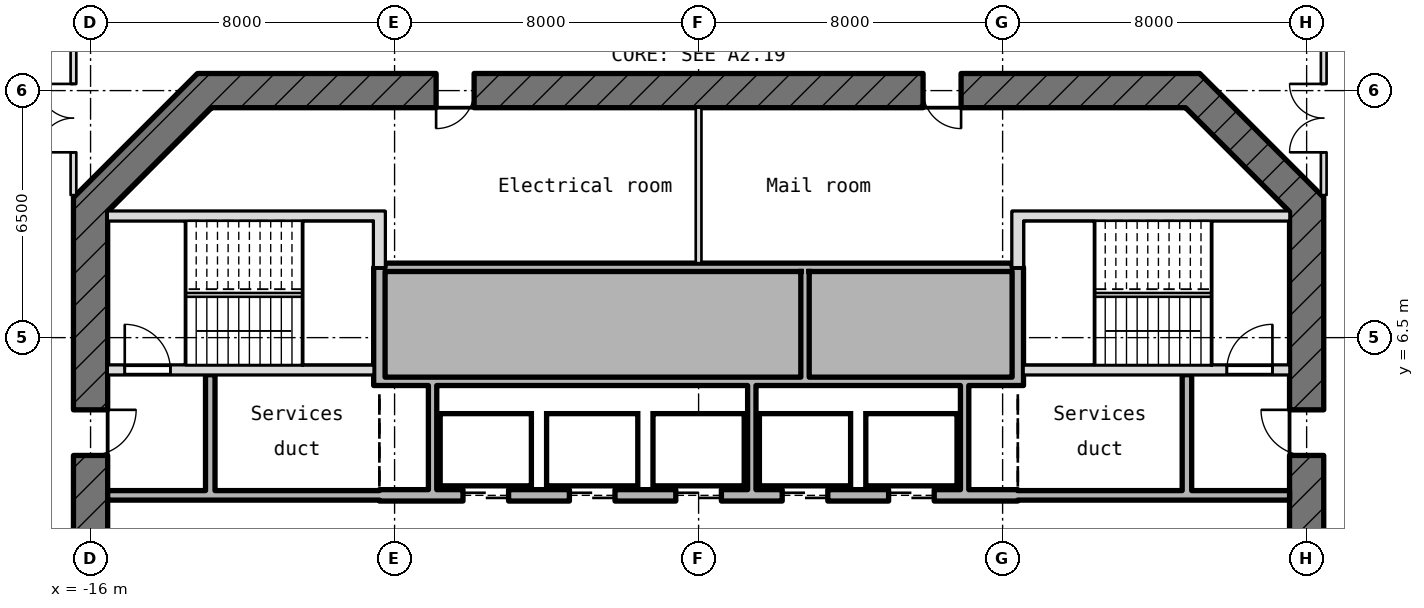
"""IFC4 building model, lengths in metres.
Left out: names, types, materials, properties, quantities, classifications, styles, units other than length and angle.
Written with IfcOpenShell. Run it as: python <this file> out.ifc"""

import sys

from ifc_helpers import new_model, si_unit, direction, frame, frame_2d, origin, place, context, subcontext, project, spatial, rectangle, extrude, element, fill, save


model = new_model("IFC4")
c1 = context("Model", 3, precision=1e-05, world=origin(), true_north=direction((0.0, 1.0)))
c2 = subcontext(c1, "Body", "Model", "MODEL_VIEW")
j1 = project(units=[si_unit("LENGTHUNIT", "METRE"), si_unit("PLANEANGLEUNIT", "RADIAN")], contexts=[c1])
p1 = place(None, origin())
s1 = spatial("IfcSite", under=j1, at=p1, CompositionType="ELEMENT")
p2 = place(p1, origin())
s2 = spatial("IfcBuilding", under=s1, at=p2, CompositionType="ELEMENT")
p3 = place(p2, frame((0.0, 0.0, 198.4)))
s3 = spatial("IfcBuildingStorey", under=s2, at=p3, CompositionType="ELEMENT", Elevation=198.4)
p4 = place(p3, frame((16.0, -10.186, -0.18), z_axis=(0.0, 0.0, 1.0), x_axis=(0.0, 1.0, 0.0)))
e1 = element("IfcWall", 1, at=p4, inside=s3, PredefinedType="SHEAR", context=c2, shape_type="SweptSolid", body=[
    extrude(rectangle(XDim=20.373, YDim=0.9, at=frame_2d((10.186, 0.0))), origin(), (0.0, 0.0, 1.0), 4.15),
])
p5 = place(p4, frame((8.986, 0.0, 0.18)))
e2 = element("IfcOpeningElement", 2, at=p5, cuts=e1, PredefinedType="OPENING", context=c2, shape_type="SweptSolid", body=[
    extrude(rectangle(XDim=2.4, YDim=2.1, at=frame_2d((1.2, 1.05))), frame((0.0, 0.46, 0.0), z_axis=(0.0, -1.0, 0.0), x_axis=(1.0, 0.0, 0.0)), (0.0, 0.0, 1.0), 0.92),
])
p6 = place(p4, frame((13.586, 0.0, 0.18)))
e3 = element("IfcOpeningElement", 3, at=p6, cuts=e1, PredefinedType="OPENING", context=c2, shape_type="SweptSolid", body=[
    extrude(rectangle(XDim=1.2, YDim=2.1, at=frame_2d((0.6, 1.05))), frame((0.0, 0.46, 0.0), z_axis=(0.0, -1.0, 0.0), x_axis=(1.0, 0.0, 0.0)), (0.0, 0.0, 1.0), 0.92),
])
p7 = place(p4, frame((3.586, 0.0, 0.18)))
e4 = element("IfcOpeningElement", 4, at=p7, cuts=e1, PredefinedType="OPENING", context=c2, shape_type="SweptSolid", body=[
    extrude(rectangle(XDim=1.2, YDim=2.1, at=frame_2d((0.6, 1.05))), frame((0.0, 0.46, 0.0), z_axis=(0.0, -1.0, 0.0), x_axis=(1.0, 0.0, 0.0)), (0.0, 0.0, 1.0), 0.92),
])
p8 = place(p3, frame((16.132, 9.868, -0.18), z_axis=(0.0, 0.0, 1.0), x_axis=(-0.707106781187, 0.707106781187, 0.0)))
e5 = element("IfcWall", 5, at=p8, inside=s3, PredefinedType="SHEAR", context=c2, shape_type="SweptSolid", body=[
    extrude(rectangle(XDim=4.615, YDim=0.9, at=frame_2d((2.308, 0.0))), origin(), (0.0, 0.0, 1.0), 4.15),
])
p9 = place(p3, frame((13.186, 13.0, -0.18), z_axis=(0.0, 0.0, 1.0), x_axis=(-1.0, 0.0, 0.0)))
e6 = element("IfcWall", 6, at=p9, inside=s3, PredefinedType="SHEAR", context=c2, shape_type="SweptSolid", body=[
    extrude(rectangle(XDim=26.373, YDim=0.9, at=frame_2d((13.186, 0.0))), origin(), (0.0, 0.0, 1.0), 4.15),
])
p10 = place(p9, frame((19.094, 0.0, 0.18)))
e7 = element("IfcOpeningElement", 7, at=p10, cuts=e6, PredefinedType="OPENING", context=c2, shape_type="SweptSolid", body=[
    extrude(rectangle(XDim=1.0, YDim=2.1, at=frame_2d((0.5, 1.05))), frame((0.0, 0.46, 0.0), z_axis=(0.0, -1.0, 0.0), x_axis=(1.0, 0.0, 0.0)), (0.0, 0.0, 1.0), 0.92),
])
p11 = place(p9, frame((6.279, 0.0, 0.18)))
e8 = element("IfcOpeningElement", 8, at=p11, cuts=e6, PredefinedType="OPENING", context=c2, shape_type="SweptSolid", body=[
    extrude(rectangle(XDim=1.0, YDim=2.1, at=frame_2d((0.5, 1.05))), frame((0.0, 0.46, 0.0), z_axis=(0.0, -1.0, 0.0), x_axis=(1.0, 0.0, 0.0)), (0.0, 0.0, 1.0), 0.92),
])
p12 = place(p3, frame((-12.868, 13.132, -0.18), z_axis=(0.0, 0.0, 1.0), x_axis=(-0.707106781187, -0.707106781187, 0.0)))
e9 = element("IfcWall", 9, at=p12, inside=s3, PredefinedType="SHEAR", context=c2, shape_type="SweptSolid", body=[
    extrude(rectangle(XDim=4.615, YDim=0.9, at=frame_2d((2.308, 0.0))), origin(), (0.0, 0.0, 1.0), 4.15),
])
p13 = place(p3, frame((-16.0, 10.186, -0.18), z_axis=(0.0, 0.0, 1.0), x_axis=(0.0, -1.0, 0.0)))
e10 = element("IfcWall", 10, at=p13, inside=s3, PredefinedType="SHEAR", context=c2, shape_type="SweptSolid", body=[
    extrude(rectangle(XDim=20.373, YDim=0.9, at=frame_2d((10.186, 0.0))), origin(), (0.0, 0.0, 1.0), 4.15),
])
p14 = place(p13, frame((8.986, 0.0, 0.18)))
e11 = element("IfcOpeningElement", 11, at=p14, cuts=e10, PredefinedType="OPENING", context=c2, shape_type="SweptSolid", body=[
    extrude(rectangle(XDim=2.4, YDim=2.1, at=frame_2d((1.2, 1.05))), frame((0.0, 0.46, 0.0), z_axis=(0.0, -1.0, 0.0), x_axis=(1.0, 0.0, 0.0)), (0.0, 0.0, 1.0), 0.92),
])
p15 = place(p13, frame((5.586, 0.0, 0.18)))
e12 = element("IfcOpeningElement", 12, at=p15, cuts=e10, PredefinedType="OPENING", context=c2, shape_type="SweptSolid", body=[
    extrude(rectangle(XDim=1.2, YDim=2.1, at=frame_2d((0.6, 1.05))), frame((0.0, 0.46, 0.0), z_axis=(0.0, -1.0, 0.0), x_axis=(1.0, 0.0, 0.0)), (0.0, 0.0, 1.0), 0.92),
])
p16 = place(p3, frame((-15.55, 2.35, 0.0), z_axis=(0.0, 0.0, 1.0), x_axis=(1.0, 0.0, 0.0)))
e13 = element("IfcWall", 13, at=p16, inside=s3, PredefinedType="STANDARD", context=c2, shape_type="SweptSolid", body=[
    extrude(rectangle(XDim=7.15, YDim=0.25, at=frame_2d((3.575, 0.0))), origin(), (0.0, 0.0, 1.0), 3.97),
])
p17 = place(p3, frame((-8.4, 2.35, -0.18), z_axis=(0.0, 0.0, 1.0), x_axis=(1.0, 0.0, 0.0)))
e14 = element("IfcWall", 14, at=p17, inside=s3, PredefinedType="SHEAR", context=c2, shape_type="SweptSolid", body=[
    extrude(rectangle(XDim=16.8, YDim=0.3, at=frame_2d((8.4, 0.0))), origin(), (0.0, 0.0, 1.0), 4.15),
])
p18 = place(p17, frame((2.2, 0.0, 0.18)))
e15 = element("IfcOpeningElement", 15, at=p18, cuts=e14, PredefinedType="OPENING", context=c2, shape_type="SweptSolid", body=[
    extrude(rectangle(XDim=1.2, YDim=2.1, at=frame_2d((0.6, 1.05))), frame((0.0, 0.16, 0.0), z_axis=(0.0, -1.0, 0.0), x_axis=(1.0, 0.0, 0.0)), (0.0, 0.0, 1.0), 0.32),
])
p19 = place(p17, frame((5.0, 0.0, 0.18)))
e16 = element("IfcOpeningElement", 16, at=p19, cuts=e14, PredefinedType="OPENING", context=c2, shape_type="SweptSolid", body=[
    extrude(rectangle(XDim=1.2, YDim=2.1, at=frame_2d((0.6, 1.05))), frame((0.0, 0.16, 0.0), z_axis=(0.0, -1.0, 0.0), x_axis=(1.0, 0.0, 0.0)), (0.0, 0.0, 1.0), 0.32),
])
p20 = place(p17, frame((7.8, 0.0, 0.18)))
e17 = element("IfcOpeningElement", 17, at=p20, cuts=e14, PredefinedType="OPENING", context=c2, shape_type="SweptSolid", body=[
    extrude(rectangle(XDim=1.2, YDim=2.1, at=frame_2d((0.6, 1.05))), frame((0.0, 0.16, 0.0), z_axis=(0.0, -1.0, 0.0), x_axis=(1.0, 0.0, 0.0)), (0.0, 0.0, 1.0), 0.32),
])
p21 = place(p17, frame((10.6, 0.0, 0.18)))
e18 = element("IfcOpeningElement", 18, at=p21, cuts=e14, PredefinedType="OPENING", context=c2, shape_type="SweptSolid", body=[
    extrude(rectangle(XDim=1.2, YDim=2.1, at=frame_2d((0.6, 1.05))), frame((0.0, 0.16, 0.0), z_axis=(0.0, -1.0, 0.0), x_axis=(1.0, 0.0, 0.0)), (0.0, 0.0, 1.0), 0.32),
])
p22 = place(p17, frame((13.4, 0.0, 0.18)))
e19 = element("IfcOpeningElement", 19, at=p22, cuts=e14, PredefinedType="OPENING", context=c2, shape_type="SweptSolid", body=[
    extrude(rectangle(XDim=1.2, YDim=2.1, at=frame_2d((0.6, 1.05))), frame((0.0, 0.16, 0.0), z_axis=(0.0, -1.0, 0.0), x_axis=(1.0, 0.0, 0.0)), (0.0, 0.0, 1.0), 0.32),
])
p23 = place(p3, frame((8.4, 2.35, 0.0), z_axis=(0.0, 0.0, 1.0), x_axis=(1.0, 0.0, 0.0)))
e20 = element("IfcWall", 20, at=p23, inside=s3, PredefinedType="STANDARD", context=c2, shape_type="SweptSolid", body=[
    extrude(rectangle(XDim=7.15, YDim=0.25, at=frame_2d((3.575, 0.0))), origin(), (0.0, 0.0, 1.0), 3.97),
])
p24 = place(p3, frame((-8.25, 5.35, 0.0), z_axis=(0.0, 0.0, 1.0), x_axis=(1.0, 0.0, 0.0)))
e21 = element("IfcWall", 21, at=p24, inside=s3, PredefinedType="STANDARD", context=c2, shape_type="SweptSolid", body=[
    extrude(rectangle(XDim=16.5, YDim=0.22, at=frame_2d((8.25, 0.0))), origin(), (0.0, 0.0, 1.0), 3.97),
])
p25 = place(p3, frame((-15.55, 5.65, -0.18), z_axis=(0.0, 0.0, 1.0), x_axis=(1.0, 0.0, 0.0)))
e22 = element("IfcWall", 22, at=p25, inside=s3, PredefinedType="SHEAR", context=c2, shape_type="SweptSolid", body=[
    extrude(rectangle(XDim=7.0, YDim=0.25, at=frame_2d((3.5, 0.0))), origin(), (0.0, 0.0, 1.0), 4.15),
])
p26 = place(p25, frame((0.45, 0.0, 0.18)))
e23 = element("IfcOpeningElement", 23, at=p26, cuts=e22, PredefinedType="OPENING", context=c2, shape_type="SweptSolid", body=[
    extrude(rectangle(XDim=1.2, YDim=2.1, at=frame_2d((0.6, 1.05))), frame((0.0, 0.135, 0.0), z_axis=(0.0, -1.0, 0.0), x_axis=(1.0, 0.0, 0.0)), (0.0, 0.0, 1.0), 0.27),
])
p27 = place(p3, frame((8.55, 5.65, -0.18), z_axis=(0.0, 0.0, 1.0), x_axis=(1.0, 0.0, 0.0)))
e24 = element("IfcWall", 24, at=p27, inside=s3, PredefinedType="SHEAR", context=c2, shape_type="SweptSolid", body=[
    extrude(rectangle(XDim=7.0, YDim=0.25, at=frame_2d((3.5, 0.0))), origin(), (0.0, 0.0, 1.0), 4.15),
])
p28 = place(p27, frame((5.35, 0.0, 0.18)))
e25 = element("IfcOpeningElement", 25, at=p28, cuts=e24, PredefinedType="OPENING", context=c2, shape_type="SweptSolid", body=[
    extrude(rectangle(XDim=1.2, YDim=2.1, at=frame_2d((0.6, 1.05))), frame((0.0, 0.135, 0.0), z_axis=(0.0, -1.0, 0.0), x_axis=(1.0, 0.0, 0.0)), (0.0, 0.0, 1.0), 0.27),
])
p29 = place(p3, frame((-8.25, 8.35, 0.0), z_axis=(0.0, 0.0, 1.0), x_axis=(1.0, 0.0, 0.0)))
e26 = element("IfcWall", 26, at=p29, inside=s3, PredefinedType="STANDARD", context=c2, shape_type="SweptSolid", body=[
    extrude(rectangle(XDim=16.5, YDim=0.22, at=frame_2d((8.25, 0.0))), origin(), (0.0, 0.0, 1.0), 3.97),
])
for number, where, z_axis, x_axis in (
    (27, (-15.55, 9.7, -0.18), (0.0, 0.0, 1.0), (1.0, 0.0, 0.0)),
    (28, (8.55, 9.7, -0.18), (0.0, 0.0, 1.0), (1.0, 0.0, 0.0)),
):
    element("IfcWall", number, at=place(p3, frame(where, z_axis=z_axis, x_axis=x_axis)), inside=s3, PredefinedType="SHEAR", context=c2, shape_type="SweptSolid", body=[
        extrude(rectangle(XDim=7.0, YDim=0.25, at=frame_2d((3.5, 0.0))), origin(), (0.0, 0.0, 1.0), 4.15),
    ])
p30 = place(p3, frame((-12.85, 2.475, 0.0), z_axis=(0.0, 0.0, 1.0), x_axis=(0.0, 1.0, 0.0)))
e29 = element("IfcWall", 29, at=p30, inside=s3, PredefinedType="STANDARD", context=c2, shape_type="SweptSolid", body=[
    extrude(rectangle(XDim=3.05, YDim=0.25, at=frame_2d((1.525, 0.0))), origin(), (0.0, 0.0, 1.0), 3.97),
])
p31 = place(p3, frame((-8.4, 5.24, -0.18), z_axis=(0.0, 0.0, 1.0), x_axis=(0.0, 1.0, 0.0)))
e30 = element("IfcWall", 30, at=p31, inside=s3, PredefinedType="SHEAR", context=c2, shape_type="SweptSolid", body=[
    extrude(rectangle(XDim=3.11, YDim=0.3, at=frame_2d((1.555, 0.0))), origin(), (0.0, 0.0, 1.0), 4.15),
])
p32 = place(p3, frame((-8.4, 8.35, -0.18), z_axis=(0.0, 0.0, 1.0), x_axis=(0.0, 1.0, 0.0)))
e31 = element("IfcWall", 31, at=p32, inside=s3, PredefinedType="SHEAR", context=c2, shape_type="SweptSolid", body=[
    extrude(rectangle(XDim=1.475, YDim=0.3, at=frame_2d((0.737, 0.0))), origin(), (0.0, 0.0, 1.0), 4.15),
])
p33 = place(p3, frame((-7.0, 2.5, 0.0), z_axis=(0.0, 0.0, 1.0), x_axis=(0.0, 1.0, 0.0)))
e32 = element("IfcWall", 32, at=p33, inside=s3, PredefinedType="STANDARD", context=c2, shape_type="SweptSolid", body=[
    extrude(rectangle(XDim=2.74, YDim=0.22, at=frame_2d((1.37, 0.0))), origin(), (0.0, 0.0, 1.0), 3.97),
])
p34 = place(p3, frame((0.0, 8.46, 0.0), z_axis=(0.0, 0.0, 1.0), x_axis=(0.0, 1.0, 0.0)))
e33 = element("IfcWall", 33, at=p34, inside=s3, PredefinedType="PARTITIONING", context=c2, shape_type="SweptSolid", body=[
    extrude(rectangle(XDim=4.09, YDim=0.15, at=frame_2d((2.045, 0.0))), origin(), (0.0, 0.0, 1.0), 3.97),
])
p35 = place(p3, frame((1.4, 2.5, 0.0), z_axis=(0.0, 0.0, 1.0), x_axis=(0.0, 1.0, 0.0)))
e34 = element("IfcWall", 34, at=p35, inside=s3, PredefinedType="STANDARD", context=c2, shape_type="SweptSolid", body=[
    extrude(rectangle(XDim=2.74, YDim=0.22, at=frame_2d((1.37, 0.0))), origin(), (0.0, 0.0, 1.0), 3.97),
])
p36 = place(p3, frame((2.8, 5.46, 0.0), z_axis=(0.0, 0.0, 1.0), x_axis=(0.0, 1.0, 0.0)))
e35 = element("IfcWall", 35, at=p36, inside=s3, PredefinedType="STANDARD", context=c2, shape_type="SweptSolid", body=[
    extrude(rectangle(XDim=2.78, YDim=0.22, at=frame_2d((1.39, 0.0))), origin(), (0.0, 0.0, 1.0), 3.97),
])
p37 = place(p3, frame((7.0, 2.5, 0.0), z_axis=(0.0, 0.0, 1.0), x_axis=(0.0, 1.0, 0.0)))
e36 = element("IfcWall", 36, at=p37, inside=s3, PredefinedType="STANDARD", context=c2, shape_type="SweptSolid", body=[
    extrude(rectangle(XDim=2.74, YDim=0.22, at=frame_2d((1.37, 0.0))), origin(), (0.0, 0.0, 1.0), 3.97),
])
p38 = place(p3, frame((8.4, 5.24, -0.18), z_axis=(0.0, 0.0, 1.0), x_axis=(0.0, 1.0, 0.0)))
e37 = element("IfcWall", 37, at=p38, inside=s3, PredefinedType="SHEAR", context=c2, shape_type="SweptSolid", body=[
    extrude(rectangle(XDim=3.11, YDim=0.3, at=frame_2d((1.555, 0.0))), origin(), (0.0, 0.0, 1.0), 4.15),
])
p39 = place(p3, frame((8.4, 8.35, -0.18), z_axis=(0.0, 0.0, 1.0), x_axis=(0.0, 1.0, 0.0)))
e38 = element("IfcWall", 38, at=p39, inside=s3, PredefinedType="SHEAR", context=c2, shape_type="SweptSolid", body=[
    extrude(rectangle(XDim=1.475, YDim=0.3, at=frame_2d((0.737, 0.0))), origin(), (0.0, 0.0, 1.0), 4.15),
])
p40 = place(p3, frame((12.85, 2.475, 0.0), z_axis=(0.0, 0.0, 1.0), x_axis=(0.0, 1.0, 0.0)))
e39 = element("IfcWall", 39, at=p40, inside=s3, PredefinedType="STANDARD", context=c2, shape_type="SweptSolid", body=[
    extrude(rectangle(XDim=3.05, YDim=0.25, at=frame_2d((1.525, 0.0))), origin(), (0.0, 0.0, 1.0), 3.97),
])
p41 = place(p3, frame((-16.45, 10.25, 0.0), z_axis=(0.0, 0.0, 1.0), x_axis=(0.0, 1.0, 0.0)))
e40 = element("IfcWall", 40, at=p41, inside=s3, PredefinedType="PARTITIONING", context=c2, shape_type="SweptSolid", body=[
    extrude(rectangle(XDim=7.284, YDim=0.15, at=frame_2d((3.642, 0.0))), origin(), (0.0, 0.0, 1.0), 3.97),
])
p42 = place(p41, frame((1.126, 0.0, 0.0)))
e41 = element("IfcOpeningElement", 41, at=p42, cuts=e40, PredefinedType="OPENING", context=c2, shape_type="SweptSolid", body=[
    extrude(rectangle(XDim=1.8, YDim=2.1, at=frame_2d((0.9, 1.05))), frame((0.0, 0.085, 0.0), z_axis=(0.0, -1.0, 0.0), x_axis=(1.0, 0.0, 0.0)), (0.0, 0.0, 1.0), 0.17),
])
p43 = place(p3, frame((16.45, 10.25, 0.0), z_axis=(0.0, 0.0, 1.0), x_axis=(0.0, 1.0, 0.0)))
e42 = element("IfcWall", 42, at=p43, inside=s3, PredefinedType="PARTITIONING", context=c2, shape_type="SweptSolid", body=[
    extrude(rectangle(XDim=7.284, YDim=0.15, at=frame_2d((3.642, 0.0))), origin(), (0.0, 0.0, 1.0), 3.97),
])
p44 = place(p43, frame((1.126, 0.0, 0.0)))
e43 = element("IfcOpeningElement", 43, at=p44, cuts=e42, PredefinedType="OPENING", context=c2, shape_type="SweptSolid", body=[
    extrude(rectangle(XDim=1.8, YDim=2.1, at=frame_2d((0.9, 1.05))), frame((0.0, 0.085, 0.0), z_axis=(0.0, -1.0, 0.0), x_axis=(1.0, 0.0, 0.0)), (0.0, 0.0, 1.0), 0.17),
])
p45 = place(p18, origin())
e44 = element("IfcDoor", 44, at=p45, inside=s3, OperationType="DOUBLE_DOOR_SLIDING", PredefinedType="DOOR", context=c2, shape_type="SweptSolid", body=[
    extrude(rectangle(XDim=1.2, YDim=2.1, at=frame_2d((0.6, 1.05))), frame((0.0, 0.025, 0.0), z_axis=(0.0, -1.0, 0.0), x_axis=(1.0, 0.0, 0.0)), (0.0, 0.0, 1.0), 0.05),
])
fill(e15, e44)
p46 = place(p19, origin())
e45 = element("IfcDoor", 45, at=p46, inside=s3, OperationType="DOUBLE_DOOR_SLIDING", PredefinedType="DOOR", context=c2, shape_type="SweptSolid", body=[
    extrude(rectangle(XDim=1.2, YDim=2.1, at=frame_2d((0.6, 1.05))), frame((0.0, 0.025, 0.0), z_axis=(0.0, -1.0, 0.0), x_axis=(1.0, 0.0, 0.0)), (0.0, 0.0, 1.0), 0.05),
])
fill(e16, e45)
p47 = place(p20, origin())
e46 = element("IfcDoor", 46, at=p47, inside=s3, OperationType="DOUBLE_DOOR_SLIDING", PredefinedType="DOOR", context=c2, shape_type="SweptSolid", body=[
    extrude(rectangle(XDim=1.2, YDim=2.1, at=frame_2d((0.6, 1.05))), frame((0.0, 0.025, 0.0), z_axis=(0.0, -1.0, 0.0), x_axis=(1.0, 0.0, 0.0)), (0.0, 0.0, 1.0), 0.05),
])
fill(e17, e46)
p48 = place(p21, origin())
e47 = element("IfcDoor", 47, at=p48, inside=s3, OperationType="DOUBLE_DOOR_SLIDING", PredefinedType="DOOR", context=c2, shape_type="SweptSolid", body=[
    extrude(rectangle(XDim=1.2, YDim=2.1, at=frame_2d((0.6, 1.05))), frame((0.0, 0.025, 0.0), z_axis=(0.0, -1.0, 0.0), x_axis=(1.0, 0.0, 0.0)), (0.0, 0.0, 1.0), 0.05),
])
fill(e18, e47)
p49 = place(p22, origin())
e48 = element("IfcDoor", 48, at=p49, inside=s3, OperationType="DOUBLE_DOOR_SLIDING", PredefinedType="DOOR", context=c2, shape_type="SweptSolid", body=[
    extrude(rectangle(XDim=1.2, YDim=2.1, at=frame_2d((0.6, 1.05))), frame((0.0, 0.025, 0.0), z_axis=(0.0, -1.0, 0.0), x_axis=(1.0, 0.0, 0.0)), (0.0, 0.0, 1.0), 0.05),
])
fill(e19, e48)
p50 = place(p26, origin())
e49 = element("IfcDoor", 49, at=p50, inside=s3, OperationType="SINGLE_SWING_RIGHT", PredefinedType="DOOR", context=c2, shape_type="SweptSolid", body=[
    extrude(rectangle(XDim=1.2, YDim=2.1, at=frame_2d((0.6, 1.05))), frame((0.0, 0.025, 0.0), z_axis=(0.0, -1.0, 0.0), x_axis=(1.0, 0.0, 0.0)), (0.0, 0.0, 1.0), 0.05),
])
fill(e23, e49)
p51 = place(p28, origin())
e50 = element("IfcDoor", 50, at=p51, inside=s3, OperationType="SINGLE_SWING_RIGHT", PredefinedType="DOOR", context=c2, shape_type="SweptSolid", body=[
    extrude(rectangle(XDim=1.2, YDim=2.1, at=frame_2d((0.6, 1.05))), frame((0.0, 0.025, 0.0), z_axis=(0.0, -1.0, 0.0), x_axis=(1.0, 0.0, 0.0)), (0.0, 0.0, 1.0), 0.05),
])
fill(e25, e50)
p52 = place(p15, origin())
e51 = element("IfcDoor", 51, at=p52, inside=s3, OperationType="SINGLE_SWING_RIGHT", PredefinedType="DOOR", context=c2, shape_type="SweptSolid", body=[
    extrude(rectangle(XDim=1.2, YDim=2.1, at=frame_2d((0.6, 1.05))), frame((0.0, 0.025, 0.0), z_axis=(0.0, -1.0, 0.0), x_axis=(1.0, 0.0, 0.0)), (0.0, 0.0, 1.0), 0.05),
])
fill(e12, e51)
p53 = place(p6, origin())
e52 = element("IfcDoor", 52, at=p53, inside=s3, OperationType="SINGLE_SWING_RIGHT", PredefinedType="DOOR", context=c2, shape_type="SweptSolid", body=[
    extrude(rectangle(XDim=1.2, YDim=2.1, at=frame_2d((0.6, 1.05))), frame((0.0, 0.025, 0.0), z_axis=(0.0, -1.0, 0.0), x_axis=(1.0, 0.0, 0.0)), (0.0, 0.0, 1.0), 0.05),
])
fill(e3, e52)
p54 = place(p10, origin())
e53 = element("IfcDoor", 53, at=p54, inside=s3, OperationType="SINGLE_SWING_RIGHT", PredefinedType="DOOR", context=c2, shape_type="SweptSolid", body=[
    extrude(rectangle(XDim=1.0, YDim=2.1, at=frame_2d((0.5, 1.05))), frame((0.0, 0.025, 0.0), z_axis=(0.0, -1.0, 0.0), x_axis=(1.0, 0.0, 0.0)), (0.0, 0.0, 1.0), 0.05),
])
fill(e7, e53)
p55 = place(p11, origin())
e54 = element("IfcDoor", 54, at=p55, inside=s3, OperationType="SINGLE_SWING_RIGHT", PredefinedType="DOOR", context=c2, shape_type="SweptSolid", body=[
    extrude(rectangle(XDim=1.0, YDim=2.1, at=frame_2d((0.5, 1.05))), frame((0.0, 0.025, 0.0), z_axis=(0.0, -1.0, 0.0), x_axis=(1.0, 0.0, 0.0)), (0.0, 0.0, 1.0), 0.05),
])
fill(e8, e54)
p56 = place(p42, origin())
e55 = element("IfcDoor", 55, at=p56, inside=s3, OperationType="DOUBLE_DOOR_SINGLE_SWING", PredefinedType="DOOR", context=c2, shape_type="SweptSolid", body=[
    extrude(rectangle(XDim=1.8, YDim=2.1, at=frame_2d((0.9, 1.05))), frame((0.0, 0.025, 0.0), z_axis=(0.0, -1.0, 0.0), x_axis=(1.0, 0.0, 0.0)), (0.0, 0.0, 1.0), 0.05),
])
fill(e41, e55)
p57 = place(p44, origin())
e56 = element("IfcDoor", 56, at=p57, inside=s3, OperationType="DOUBLE_DOOR_SINGLE_SWING", PredefinedType="DOOR", context=c2, shape_type="SweptSolid", body=[
    extrude(rectangle(XDim=1.8, YDim=2.1, at=frame_2d((0.9, 1.05))), frame((0.0, 0.025, 0.0), z_axis=(0.0, -1.0, 0.0), x_axis=(1.0, 0.0, 0.0)), (0.0, 0.0, 1.0), 0.05),
])
fill(e43, e56)
save(model, sys.argv[1])
